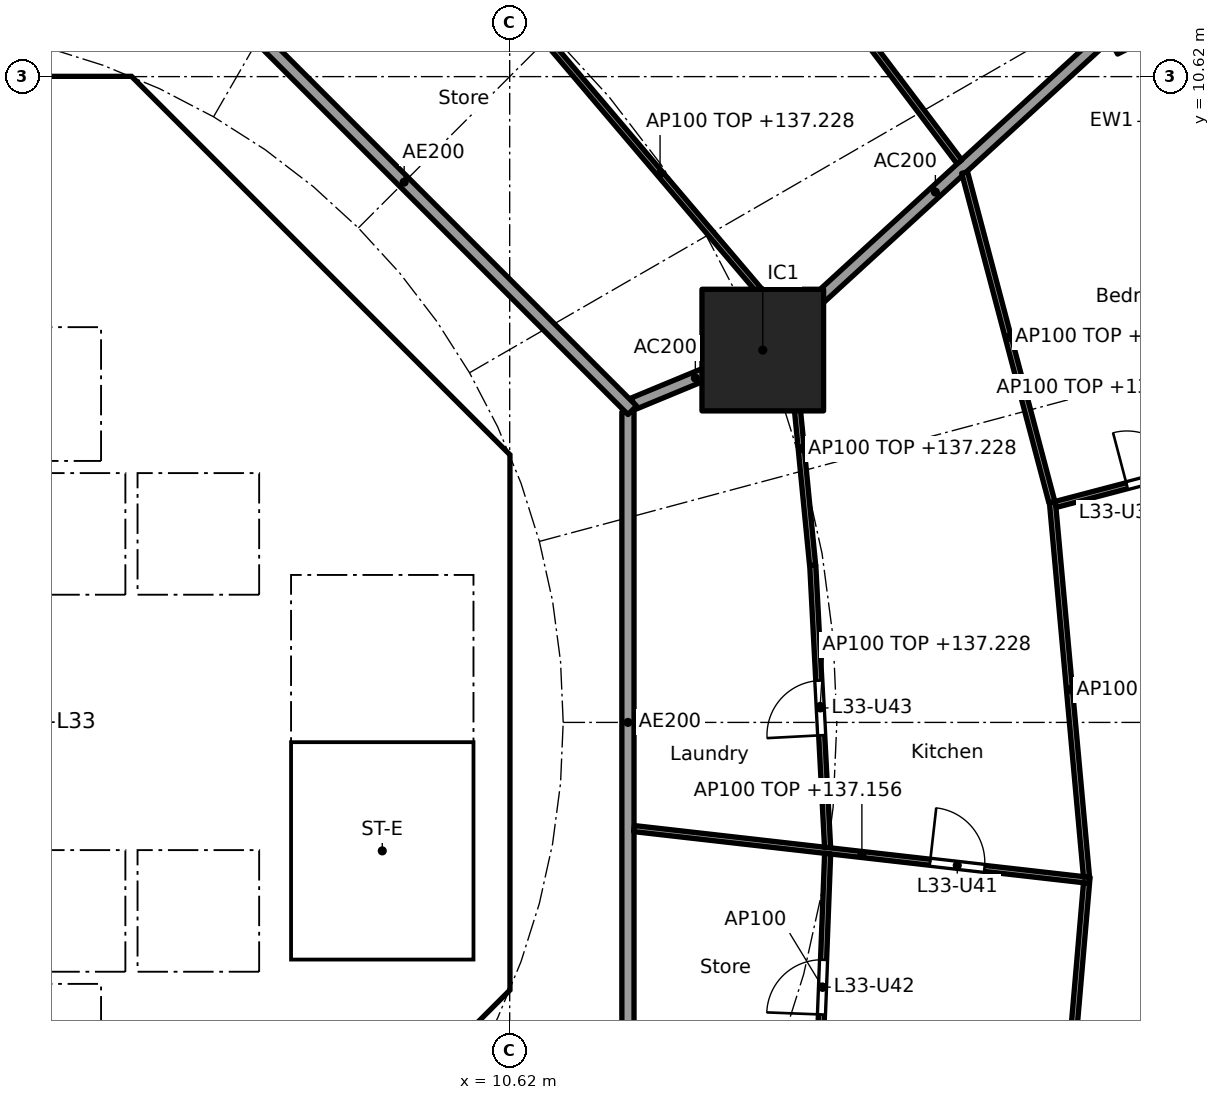
"""IFC4 building model, lengths in metres.
Left out: names, types, materials, properties, quantities, classifications, styles, units other than length and angle.
Written with IfcOpenShell. Run it as: python <this file> out.ifc"""

import sys

from ifc_helpers import new_model, si_unit, direction, frame, frame_2d, origin, origin_2d, place, context, subcontext, project, spatial, polyline, rectangle, hollow_rectangle, outline, extrude, element, fill, save


model = new_model("IFC4")
c1 = context("Model", 3, precision=1e-05, world=origin(), true_north=direction((0.0, 1.0)))
c2 = subcontext(c1, "Body", "Model", "MODEL_VIEW")
j1 = project(units=[si_unit("LENGTHUNIT", "METRE"), si_unit("PLANEANGLEUNIT", "RADIAN")], contexts=[c1])
p1 = place(None, origin())
s1 = spatial("IfcSite", under=j1, at=p1, CompositionType="ELEMENT")
p2 = place(p1, origin())
s2 = spatial("IfcBuilding", under=s1, at=p2, CompositionType="ELEMENT")
p3 = place(p2, frame((0.0, 0.0, 134.4)))
s3 = spatial("IfcBuildingStorey", under=s2, at=p3, CompositionType="ELEMENT", Elevation=134.4)
p4 = place(p3, frame((20.747, 11.73, 0.0), z_axis=(0.0, 0.0, 1.0), x_axis=(-0.452462697578, 0.891783329795, 0.0)))
e1 = element("IfcColumn", 1, at=p4, inside=s3, PredefinedType="COLUMN", context=c2, shape_type="SweptSolid", body=[
    extrude(hollow_rectangle(XDim=1.2, YDim=0.9, WallThickness=0.04, at=origin_2d()), origin(), (0.0, 0.0, 1.0), 3.7),
])
p5 = place(p3, frame((14.782, 6.123, 0.0), z_axis=(0.0, 0.0, 1.0), x_axis=(1.0, 0.0, 0.0)))
e2 = element("IfcColumn", 2, at=p5, inside=s3, PredefinedType="COLUMN", context=c2, shape_type="SweptSolid", body=[
    extrude(rectangle(XDim=2.0, YDim=2.0, at=origin_2d()), origin(), (0.0, 0.0, 1.0), 3.7),
])
p6 = place(p3, frame((9.988, 4.613, 0.0), z_axis=(0.0, 0.0, 1.0), x_axis=(-0.707106781187, 0.707106781187, 0.0)))
e3 = element("IfcWall", 3, at=p6, inside=s3, PredefinedType="SHEAR", context=c2, shape_type="SweptSolid", body=[
    extrude(rectangle(XDim=7.602, YDim=0.6, at=frame_2d((3.801, 0.0))), origin(), (0.0, 0.0, 1.0), 3.44),
])
p7 = place(p6, frame((3.201, 0.0, 0.0)))
e4 = element("IfcOpeningElement", 4, at=p7, cuts=e3, PredefinedType="OPENING", context=c2, shape_type="SweptSolid", body=[
    extrude(rectangle(XDim=1.2, YDim=2.1, at=frame_2d((0.6, 1.05))), frame((0.0, 0.31, 0.0), z_axis=(0.0, -1.0, 0.0), x_axis=(1.0, 0.0, 0.0)), (0.0, 0.0, 1.0), 0.62),
])
p8 = place(p3, frame((4.613, -9.988, 0.0), z_axis=(0.0, 0.0, 1.0), x_axis=(0.707106781187, 0.707106781187, 0.0)))
e5 = element("IfcWall", 5, at=p8, inside=s3, PredefinedType="SHEAR", context=c2, shape_type="SweptSolid", body=[
    extrude(rectangle(XDim=7.602, YDim=0.6, at=frame_2d((3.801, 0.0))), origin(), (0.0, 0.0, 1.0), 3.44),
])
p9 = place(p8, frame((3.201, 0.0, 0.0)))
e6 = element("IfcOpeningElement", 6, at=p9, cuts=e5, PredefinedType="OPENING", context=c2, shape_type="SweptSolid", body=[
    extrude(rectangle(XDim=1.2, YDim=2.1, at=frame_2d((0.6, 1.05))), frame((0.0, 0.31, 0.0), z_axis=(0.0, -1.0, 0.0), x_axis=(1.0, 0.0, 0.0)), (0.0, 0.0, 1.0), 0.62),
])
p10 = place(p3, frame((4.0, 4.3, 0.0), z_axis=(0.0, 0.0, 1.0), x_axis=(0.0, 1.0, 0.0)))
e7 = element("IfcWall", 7, at=p10, inside=s3, PredefinedType="SOLIDWALL", context=c2, shape_type="SweptSolid", body=[
    extrude(rectangle(XDim=2.2, YDim=0.2, at=frame_2d((1.1, 0.0))), origin(), (0.0, 0.0, 1.0), 3.44),
])
p11 = place(p10, frame((0.55, 0.0, 0.0)))
e8 = element("IfcOpeningElement", 8, at=p11, cuts=e7, PredefinedType="OPENING", context=c2, shape_type="SweptSolid", body=[
    extrude(rectangle(XDim=1.1, YDim=2.1, at=frame_2d((0.55, 1.05))), frame((0.0, 0.11, 0.0), z_axis=(0.0, -1.0, 0.0), x_axis=(1.0, 0.0, 0.0)), (0.0, 0.0, 1.0), 0.22),
])
p12 = place(p3, frame((-6.7, 2.0, 0.0), z_axis=(0.0, 0.0, 1.0), x_axis=(1.0, 0.0, 0.0)))
e9 = element("IfcWall", 9, at=p12, inside=s3, PredefinedType="SOLIDWALL", context=c2, shape_type="SweptSolid", body=[
    extrude(rectangle(XDim=13.4, YDim=0.2, at=frame_2d((6.7, 0.0))), origin(), (0.0, 0.0, 1.0), 3.44),
])
p13 = place(p12, frame((0.65, 0.0, 0.0)))
e10 = element("IfcOpeningElement", 10, at=p13, cuts=e9, PredefinedType="OPENING", context=c2, shape_type="SweptSolid", body=[
    extrude(rectangle(XDim=1.1, YDim=2.1, at=frame_2d((0.55, 1.05))), frame((0.0, 0.11, 0.0), z_axis=(0.0, -1.0, 0.0), x_axis=(1.0, 0.0, 0.0)), (0.0, 0.0, 1.0), 0.22),
])
p14 = place(p12, frame((2.85, 0.0, 0.0)))
e11 = element("IfcOpeningElement", 11, at=p14, cuts=e9, PredefinedType="OPENING", context=c2, shape_type="SweptSolid", body=[
    extrude(rectangle(XDim=1.1, YDim=2.1, at=frame_2d((0.55, 1.05))), frame((0.0, 0.11, 0.0), z_axis=(0.0, -1.0, 0.0), x_axis=(1.0, 0.0, 0.0)), (0.0, 0.0, 1.0), 0.22),
])
p15 = place(p12, frame((5.05, 0.0, 0.0)))
e12 = element("IfcOpeningElement", 12, at=p15, cuts=e9, PredefinedType="OPENING", context=c2, shape_type="SweptSolid", body=[
    extrude(rectangle(XDim=1.1, YDim=2.1, at=frame_2d((0.55, 1.05))), frame((0.0, 0.11, 0.0), z_axis=(0.0, -1.0, 0.0), x_axis=(1.0, 0.0, 0.0)), (0.0, 0.0, 1.0), 0.22),
])
p16 = place(p3, frame((6.7, 4.0, 0.0), z_axis=(0.0, 0.0, 1.0), x_axis=(1.0, 0.0, 0.0)))
e13 = element("IfcWall", 13, at=p16, inside=s3, PredefinedType="SOLIDWALL", context=c2, shape_type="SweptSolid", body=[
    extrude(rectangle(XDim=3.325, YDim=0.2, at=frame_2d((1.662, 0.0))), origin(), (0.0, 0.0, 1.0), 3.44),
])
p17 = place(p16, frame((1.25, 0.0, 0.0)))
e14 = element("IfcOpeningElement", 14, at=p17, cuts=e13, PredefinedType="OPENING", context=c2, shape_type="SweptSolid", body=[
    extrude(rectangle(XDim=1.1, YDim=2.1, at=frame_2d((0.55, 1.05))), frame((0.0, 0.11, 0.0), z_axis=(0.0, -1.0, 0.0), x_axis=(1.0, 0.0, 0.0)), (0.0, 0.0, 1.0), 0.22),
])
p18 = place(p3, frame((4.0, 7.025, 0.0), z_axis=(0.0, 0.0, 1.0), x_axis=(0.0, 1.0, 0.0)))
e15 = element("IfcWall", 15, at=p18, inside=s3, PredefinedType="SOLIDWALL", context=c2, shape_type="SweptSolid", body=[
    extrude(rectangle(XDim=3.0, YDim=0.2, at=frame_2d((1.5, 0.0))), origin(), (0.0, 0.0, 1.0), 3.44),
])
p19 = place(p18, frame((0.925, 0.0, 0.0)))
e16 = element("IfcOpeningElement", 16, at=p19, cuts=e15, PredefinedType="OPENING", context=c2, shape_type="SweptSolid", body=[
    extrude(rectangle(XDim=1.1, YDim=2.1, at=frame_2d((0.55, 1.05))), frame((0.0, 0.11, 0.0), z_axis=(0.0, -1.0, 0.0), x_axis=(1.0, 0.0, 0.0)), (0.0, 0.0, 1.0), 0.22),
])
p20 = place(p3, frame((4.0, -6.5, 0.0), z_axis=(0.0, 0.0, 1.0), x_axis=(0.0, 1.0, 0.0)))
e17 = element("IfcWall", 17, at=p20, inside=s3, PredefinedType="SOLIDWALL", context=c2, shape_type="SweptSolid", body=[
    extrude(rectangle(XDim=2.2, YDim=0.2, at=frame_2d((1.1, 0.0))), origin(), (0.0, 0.0, 1.0), 3.44),
])
p21 = place(p20, frame((0.55, 0.0, 0.0)))
e18 = element("IfcOpeningElement", 18, at=p21, cuts=e17, PredefinedType="OPENING", context=c2, shape_type="SweptSolid", body=[
    extrude(rectangle(XDim=1.1, YDim=2.1, at=frame_2d((0.55, 1.05))), frame((0.0, 0.11, 0.0), z_axis=(0.0, -1.0, 0.0), x_axis=(1.0, 0.0, 0.0)), (0.0, 0.0, 1.0), 0.22),
])
p22 = place(p3, frame((-6.7, -2.0, 0.0), z_axis=(0.0, 0.0, 1.0), x_axis=(1.0, 0.0, 0.0)))
e19 = element("IfcWall", 19, at=p22, inside=s3, PredefinedType="SOLIDWALL", context=c2, shape_type="SweptSolid", body=[
    extrude(rectangle(XDim=13.4, YDim=0.2, at=frame_2d((6.7, 0.0))), origin(), (0.0, 0.0, 1.0), 3.44),
])
p23 = place(p22, frame((0.65, 0.0, 0.0)))
e20 = element("IfcOpeningElement", 20, at=p23, cuts=e19, PredefinedType="OPENING", context=c2, shape_type="SweptSolid", body=[
    extrude(rectangle(XDim=1.1, YDim=2.1, at=frame_2d((0.55, 1.05))), frame((0.0, 0.11, 0.0), z_axis=(0.0, -1.0, 0.0), x_axis=(1.0, 0.0, 0.0)), (0.0, 0.0, 1.0), 0.22),
])
p24 = place(p22, frame((2.85, 0.0, 0.0)))
e21 = element("IfcOpeningElement", 21, at=p24, cuts=e19, PredefinedType="OPENING", context=c2, shape_type="SweptSolid", body=[
    extrude(rectangle(XDim=1.1, YDim=2.1, at=frame_2d((0.55, 1.05))), frame((0.0, 0.11, 0.0), z_axis=(0.0, -1.0, 0.0), x_axis=(1.0, 0.0, 0.0)), (0.0, 0.0, 1.0), 0.22),
])
p25 = place(p3, origin())
e22 = element("IfcWall", 22, at=p25, inside=s3, PredefinedType="SHEAR", context=c2, shape_type="SweptSolid", body=[
    extrude(outline(polyline([(-4.152, 10.025), (-4.401, 9.776), (-4.825, 10.2), (-4.401, 10.625), (4.401, 10.625), (4.825, 10.2), (4.401, 9.776), (4.152, 10.025), (-4.152, 10.025)])), origin(), (0.0, 0.0, 1.0), 3.44),
])
p26 = place(p3, origin())
e23 = element("IfcWall", 23, at=p26, inside=s3, PredefinedType="SHEAR", context=c2, shape_type="SweptSolid", body=[
    extrude(outline(polyline([(9.776, -4.401), (10.025, -4.152), (10.025, -3.801), (10.025, 4.152), (9.776, 4.401), (10.2, 4.825), (10.625, 4.401), (10.625, -4.401), (10.2, -4.825), (9.776, -4.401)])), origin(), (0.0, 0.0, 1.0), 3.44),
])
p27 = place(p3, origin())
e24 = element("IfcWall", 24, at=p27, inside=s3, PredefinedType="SOLIDWALL", context=c2, shape_type="SweptSolid", body=[
    extrude(outline(polyline([(-6.7, -2.1), (-6.5, -2.1), (-6.5, -4.1), (-4.5, -4.1), (-4.5, -2.1), (-4.3, -2.1), (-4.3, -4.1), (-2.3, -4.1), (-2.3, -2.1), (-2.1, -2.1), (-2.1, -4.1), (-0.1, -4.1), (-0.1, -2.1), (0.1, -2.1), (0.1, -4.1), (2.1, -4.1), (2.1, -2.1), (2.3, -2.1), (2.3, -4.1), (4.3, -4.1), (4.3, -2.1), (4.5, -2.1), (4.5, -4.1), (6.5, -4.1), (6.5, -2.1), (6.7, -2.1), (6.7, -4.3), (-6.7, -4.3), (-6.7, -2.1)])), origin(), (0.0, 0.0, 1.0), 3.44),
])
p28 = place(p3, origin())
e25 = element("IfcWall", 25, at=p28, inside=s3, PredefinedType="SOLIDWALL", context=c2, shape_type="SweptSolid", body=[
    extrude(outline(polyline([(-6.5, 2.1), (-6.7, 2.1), (-6.7, 4.3), (6.7, 4.3), (6.7, 2.1), (6.5, 2.1), (6.5, 4.1), (4.5, 4.1), (4.5, 2.1), (4.3, 2.1), (4.3, 4.1), (2.3, 4.1), (2.3, 2.1), (2.1, 2.1), (2.1, 4.1), (0.1, 4.1), (0.1, 2.1), (-0.1, 2.1), (-0.1, 4.1), (-2.1, 4.1), (-2.1, 2.1), (-2.3, 2.1), (-2.3, 4.1), (-4.3, 4.1), (-4.3, 2.1), (-4.5, 2.1), (-4.5, 4.1), (-6.5, 4.1), (-6.5, 2.1)])), origin(), (0.0, 0.0, 1.0), 3.44),
])
p29 = place(p3, origin())
e26 = element("IfcWall", 26, at=p29, inside=s3, PredefinedType="SOLIDWALL", context=c2, shape_type="SweptSolid", body=[
    extrude(outline(polyline([(4.1, 6.5), (-4.1, 6.5), (-4.1, 7.025), (4.1, 7.025), (4.1, 6.5)])), origin(), (0.0, 0.0, 1.0), 3.44),
])
p30 = place(p3, origin())
e27 = element("IfcWall", 27, at=p30, inside=s3, PredefinedType="SOLIDWALL", context=c2, shape_type="SweptSolid", body=[
    extrude(outline(polyline([(7.025, -3.9), (6.7, -3.9), (6.7, 3.9), (7.025, 3.9), (7.025, -3.9)])), origin(), (0.0, 0.0, 1.0), 3.44),
])
p31 = place(p3, origin())
e28 = element("IfcWall", 28, at=p31, inside=s3, PredefinedType="SOLIDWALL", context=c2, shape_type="SweptSolid", body=[
    extrude(outline(polyline([(10.025, -4.1), (6.7, -4.1), (6.7, -3.9), (10.025, -3.9), (10.025, -4.1)])), origin(), (0.0, 0.0, 1.0), 3.44),
])
p32 = place(p3, frame((12.657, 5.243, 0.0), z_axis=(0.0, 0.0, 1.0), x_axis=(0.923876145736, 0.382691608661, 0.0)))
e29 = element("IfcWall", 29, at=p32, inside=s3, PredefinedType="PARTITIONING", context=c2, shape_type="SweptSolid", body=[
    extrude(rectangle(XDim=2.2, YDim=0.2, at=frame_2d((1.1, 0.0))), origin(), (0.0, 0.0, 1.0), 3.44),
])
p33 = place(p3, frame((14.819, 6.157, 0.0), z_axis=(0.0, 0.0, 1.0), x_axis=(0.737608883396, 0.675228209671, 0.0)))
e30 = element("IfcWall", 30, at=p33, inside=s3, PredefinedType="PARTITIONING", context=c2, shape_type="SweptSolid", body=[
    extrude(rectangle(XDim=7.596, YDim=0.2, at=frame_2d((3.798, 0.0))), origin(), (0.0, 0.0, 1.0), 3.44),
])
p34 = place(p3, frame((12.565, -5.104, 0.0), z_axis=(0.0, 0.0, 1.0), x_axis=(0.0, 1.0, 0.0)))
e31 = element("IfcWall", 31, at=p34, inside=s3, PredefinedType="PARTITIONING", context=c2, shape_type="SweptSolid", body=[
    extrude(rectangle(XDim=10.209, YDim=0.2, at=frame_2d((5.104, 0.0))), origin(), (0.0, 0.0, 1.0), 3.44),
])
p35 = place(p3, frame((12.635, 5.134, 0.0), z_axis=(0.0, 0.0, 1.0), x_axis=(-0.707106781187, 0.707106781187, 0.0)))
e32 = element("IfcWall", 32, at=p35, inside=s3, PredefinedType="PARTITIONING", context=c2, shape_type="SweptSolid", body=[
    extrude(rectangle(XDim=10.609, YDim=0.2, at=frame_2d((5.305, 0.0))), origin(), (0.0, 0.0, 1.0), 3.44),
])
p36 = place(p3, frame((12.664, -1.746, 0.0), z_axis=(0.0, 0.0, 1.0), x_axis=(0.993605172276, -0.112910414164, 0.0)))
e33 = element("IfcWall", 33, at=p36, inside=s3, PredefinedType="PARTITIONING", context=c2, shape_type="SweptSolid", body=[
    extrude(rectangle(XDim=7.544, YDim=0.1, at=frame_2d((3.772, 0.0))), origin(), (0.0, 0.0, 1.0), 2.756),
])
p37 = place(p36, frame((4.901, 0.0, 0.0)))
e34 = element("IfcOpeningElement", 34, at=p37, cuts=e33, PredefinedType="OPENING", context=c2, shape_type="SweptSolid", body=[
    extrude(rectangle(XDim=0.9, YDim=2.1, at=frame_2d((0.45, 1.05))), frame((0.0, 0.06, 0.0), z_axis=(0.0, -1.0, 0.0), x_axis=(1.0, 0.0, 0.0)), (0.0, 0.0, 1.0), 0.12),
])
p38 = place(p3, frame((15.848, -2.058, 0.0), z_axis=(0.0, 0.0, 1.0), x_axis=(-0.052509224895, 0.998620439056, 0.0)))
e35 = element("IfcWall", 35, at=p38, inside=s3, PredefinedType="PARTITIONING", context=c2, shape_type="SweptSolid", body=[
    extrude(rectangle(XDim=4.649, YDim=0.1, at=frame_2d((2.325, 0.0))), origin(), (0.0, 0.0, 1.0), 2.828),
])
p39 = place(p38, frame((1.85, 0.0, 0.0)))
e36 = element("IfcOpeningElement", 36, at=p39, cuts=e35, PredefinedType="OPENING", context=c2, shape_type="SweptSolid", body=[
    extrude(rectangle(XDim=0.9, YDim=2.1, at=frame_2d((0.45, 1.05))), frame((0.0, 0.06, 0.0), z_axis=(0.0, -1.0, 0.0), x_axis=(1.0, 0.0, 0.0)), (0.0, 0.0, 1.0), 0.12),
])
p40 = place(p3, frame((15.849, -2.158, 0.0), z_axis=(0.0, 0.0, 1.0), x_axis=(-0.038390448414, -0.999262815014, 0.0)))
e37 = element("IfcWall", 37, at=p40, inside=s3, PredefinedType="PARTITIONING", context=c2, shape_type="SweptSolid", body=[
    extrude(rectangle(XDim=4.394, YDim=0.1, at=frame_2d((2.197, 0.0))), origin(), (0.0, 0.0, 1.0), 3.44),
])
p41 = place(p40, frame((1.747, 0.0, 0.0)))
e38 = element("IfcOpeningElement", 38, at=p41, cuts=e37, PredefinedType="OPENING", context=c2, shape_type="SweptSolid", body=[
    extrude(rectangle(XDim=0.9, YDim=2.1, at=frame_2d((0.45, 1.05))), frame((0.0, 0.06, 0.0), z_axis=(0.0, -1.0, 0.0), x_axis=(1.0, 0.0, 0.0)), (0.0, 0.0, 1.0), 0.12),
])
p42 = place(p3, frame((20.106, -2.542, 0.0), z_axis=(0.0, 0.0, 1.0), x_axis=(-0.090567755363, 0.995890296011, 0.0)))
e39 = element("IfcWall", 39, at=p42, inside=s3, PredefinedType="PARTITIONING", context=c2, shape_type="SweptSolid", body=[
    extrude(rectangle(XDim=6.189, YDim=0.1, at=frame_2d((3.095, 0.0))), origin(), (0.0, 0.0, 1.0), 2.828),
])
p43 = place(p3, frame((20.106, -2.642, 0.0), z_axis=(0.0, 0.0, 1.0), x_axis=(-0.085672025822, -0.996323393277, 0.0)))
e40 = element("IfcWall", 40, at=p43, inside=s3, PredefinedType="PARTITIONING", context=c2, shape_type="SweptSolid", body=[
    extrude(rectangle(XDim=6.007, YDim=0.1, at=frame_2d((3.003, 0.0))), origin(), (0.0, 0.0, 1.0), 2.828),
])
p44 = place(p43, frame((2.554, 0.0, 0.0)))
e41 = element("IfcOpeningElement", 41, at=p44, cuts=e40, PredefinedType="OPENING", context=c2, shape_type="SweptSolid", body=[
    extrude(rectangle(XDim=0.9, YDim=2.1, at=frame_2d((0.45, 1.05))), frame((0.0, 0.06, 0.0), z_axis=(0.0, -1.0, 0.0), x_axis=(1.0, 0.0, 0.0)), (0.0, 0.0, 1.0), 0.12),
])
p45 = place(p3, frame((15.602, 2.584, 0.0), z_axis=(0.0, 0.0, 1.0), x_axis=(-0.097196343206, 0.995265226393, 0.0)))
e42 = element("IfcWall", 42, at=p45, inside=s3, PredefinedType="PARTITIONING", context=c2, shape_type="SweptSolid", body=[
    extrude(rectangle(XDim=3.856, YDim=0.1, at=frame_2d((1.928, 0.0))), origin(), (0.0, 0.0, 1.0), 2.828),
])
p46 = place(p3, frame((19.598, 3.584, 0.0), z_axis=(0.0, 0.0, 1.0), x_axis=(0.967108750962, 0.254363251695, 0.0)))
e43 = element("IfcWall", 43, at=p46, inside=s3, PredefinedType="PARTITIONING", context=c2, shape_type="SweptSolid", body=[
    extrude(rectangle(XDim=3.327, YDim=0.1, at=frame_2d((1.663, 0.0))), origin(), (0.0, 0.0, 1.0), 2.828),
])
p47 = place(p46, frame((1.213, 0.0, 0.0)))
e44 = element("IfcOpeningElement", 44, at=p47, cuts=e43, PredefinedType="OPENING", context=c2, shape_type="SweptSolid", body=[
    extrude(rectangle(XDim=0.9, YDim=2.1, at=frame_2d((0.45, 1.05))), frame((0.0, 0.06, 0.0), z_axis=(0.0, -1.0, 0.0), x_axis=(1.0, 0.0, 0.0)), (0.0, 0.0, 1.0), 0.12),
])
p48 = place(p3, frame((19.537, 3.62, 0.0), z_axis=(0.0, 0.0, 1.0), x_axis=(-0.255909310473, 0.966700793841, 0.0)))
e45 = element("IfcWall", 45, at=p48, inside=s3, PredefinedType="PARTITIONING", context=c2, shape_type="SweptSolid", body=[
    extrude(rectangle(XDim=5.609, YDim=0.1, at=frame_2d((2.804, 0.0))), origin(), (0.0, 0.0, 1.0), 2.828),
])
p49 = place(p3, frame((15.153, 6.597, 0.0), z_axis=(0.0, 0.0, 1.0), x_axis=(-0.647372160855, 0.762174051874, 0.0)))
e46 = element("IfcWall", 46, at=p49, inside=s3, PredefinedType="PARTITIONING", context=c2, shape_type="SweptSolid", body=[
    extrude(rectangle(XDim=6.363, YDim=0.1, at=frame_2d((3.181, 0.0))), origin(), (0.0, 0.0, 1.0), 2.828),
])
p50 = place(p3, frame((18.016, 9.218, 0.0), z_axis=(0.0, 0.0, 1.0), x_axis=(-0.602411163107, 0.798185937338, 0.0)))
e47 = element("IfcWall", 47, at=p50, inside=s3, PredefinedType="PARTITIONING", context=c2, shape_type="SweptSolid", body=[
    extrude(rectangle(XDim=6.894, YDim=0.1, at=frame_2d((3.447, 0.0))), origin(), (0.0, 0.0, 1.0), 2.828),
])
p51 = place(p50, frame((2.972, 0.0, 0.0)))
e48 = element("IfcOpeningElement", 48, at=p51, cuts=e47, PredefinedType="OPENING", context=c2, shape_type="SweptSolid", body=[
    extrude(rectangle(XDim=0.9, YDim=2.1, at=frame_2d((0.45, 1.05))), frame((0.0, 0.06, 0.0), z_axis=(0.0, -1.0, 0.0), x_axis=(1.0, 0.0, 0.0)), (0.0, 0.0, 1.0), 0.12),
])
p52 = place(p11, origin())
e49 = element("IfcDoor", 49, at=p52, inside=s3, OperationType="DOUBLE_DOOR_SLIDING", PredefinedType="DOOR", context=c2, shape_type="SweptSolid", body=[
    extrude(rectangle(XDim=1.1, YDim=2.1, at=frame_2d((0.55, 1.05))), frame((0.0, 0.025, 0.0), z_axis=(0.0, -1.0, 0.0), x_axis=(1.0, 0.0, 0.0)), (0.0, 0.0, 1.0), 0.05),
])
fill(e8, e49)
p53 = place(p21, origin())
e50 = element("IfcDoor", 50, at=p53, inside=s3, OperationType="DOUBLE_DOOR_SLIDING", PredefinedType="DOOR", context=c2, shape_type="SweptSolid", body=[
    extrude(rectangle(XDim=1.1, YDim=2.1, at=frame_2d((0.55, 1.05))), frame((0.0, 0.025, 0.0), z_axis=(0.0, -1.0, 0.0), x_axis=(1.0, 0.0, 0.0)), (0.0, 0.0, 1.0), 0.05),
])
fill(e18, e50)
p54 = place(p17, frame((1.1, 0.0, 0.0), x_axis=(-1.0, 0.0, 0.0)))
e51 = element("IfcDoor", 51, at=p54, inside=s3, OperationType="SINGLE_SWING_LEFT", PredefinedType="DOOR", context=c2, shape_type="SweptSolid", body=[
    extrude(rectangle(XDim=1.1, YDim=2.1, at=frame_2d((0.55, 1.05))), frame((0.0, 0.025, 0.0), z_axis=(0.0, -1.0, 0.0), x_axis=(1.0, 0.0, 0.0)), (0.0, 0.0, 1.0), 0.05),
])
fill(e14, e51)
p55 = place(p19, origin())
e52 = element("IfcDoor", 52, at=p55, inside=s3, OperationType="SINGLE_SWING_RIGHT", PredefinedType="DOOR", context=c2, shape_type="SweptSolid", body=[
    extrude(rectangle(XDim=1.1, YDim=2.1, at=frame_2d((0.55, 1.05))), frame((0.0, 0.025, 0.0), z_axis=(0.0, -1.0, 0.0), x_axis=(1.0, 0.0, 0.0)), (0.0, 0.0, 1.0), 0.05),
])
fill(e16, e52)
p56 = place(p7, origin())
e53 = element("IfcDoor", 53, at=p56, inside=s3, OperationType="SINGLE_SWING_LEFT", PredefinedType="DOOR", context=c2, shape_type="SweptSolid", body=[
    extrude(rectangle(XDim=1.2, YDim=2.1, at=frame_2d((0.6, 1.05))), frame((0.0, 0.025, 0.0), z_axis=(0.0, -1.0, 0.0), x_axis=(1.0, 0.0, 0.0)), (0.0, 0.0, 1.0), 0.05),
])
fill(e4, e53)
p57 = place(p47, origin())
e54 = element("IfcDoor", 54, at=p57, inside=s3, OperationType="SINGLE_SWING_LEFT", PredefinedType="DOOR", context=c2, shape_type="SweptSolid", body=[
    extrude(rectangle(XDim=0.9, YDim=2.1, at=frame_2d((0.45, 1.05))), frame((0.0, 0.025, 0.0), z_axis=(0.0, -1.0, 0.0), x_axis=(1.0, 0.0, 0.0)), (0.0, 0.0, 1.0), 0.05),
])
fill(e44, e54)
p58 = place(p37, origin())
e55 = element("IfcDoor", 55, at=p58, inside=s3, OperationType="SINGLE_SWING_LEFT", PredefinedType="DOOR", context=c2, shape_type="SweptSolid", body=[
    extrude(rectangle(XDim=0.9, YDim=2.1, at=frame_2d((0.45, 1.05))), frame((0.0, 0.025, 0.0), z_axis=(0.0, -1.0, 0.0), x_axis=(1.0, 0.0, 0.0)), (0.0, 0.0, 1.0), 0.05),
])
fill(e34, e55)
p59 = place(p41, frame((0.9, 0.0, 0.0), x_axis=(-1.0, 0.0, 0.0)))
e56 = element("IfcDoor", 56, at=p59, inside=s3, OperationType="SINGLE_SWING_LEFT", PredefinedType="DOOR", context=c2, shape_type="SweptSolid", body=[
    extrude(rectangle(XDim=0.9, YDim=2.1, at=frame_2d((0.45, 1.05))), frame((0.0, 0.025, 0.0), z_axis=(0.0, -1.0, 0.0), x_axis=(1.0, 0.0, 0.0)), (0.0, 0.0, 1.0), 0.05),
])
fill(e38, e56)
p60 = place(p39, origin())
e57 = element("IfcDoor", 57, at=p60, inside=s3, OperationType="SINGLE_SWING_LEFT", PredefinedType="DOOR", context=c2, shape_type="SweptSolid", body=[
    extrude(rectangle(XDim=0.9, YDim=2.1, at=frame_2d((0.45, 1.05))), frame((0.0, 0.025, 0.0), z_axis=(0.0, -1.0, 0.0), x_axis=(1.0, 0.0, 0.0)), (0.0, 0.0, 1.0), 0.05),
])
fill(e36, e57)
save(model, sys.argv[1])
